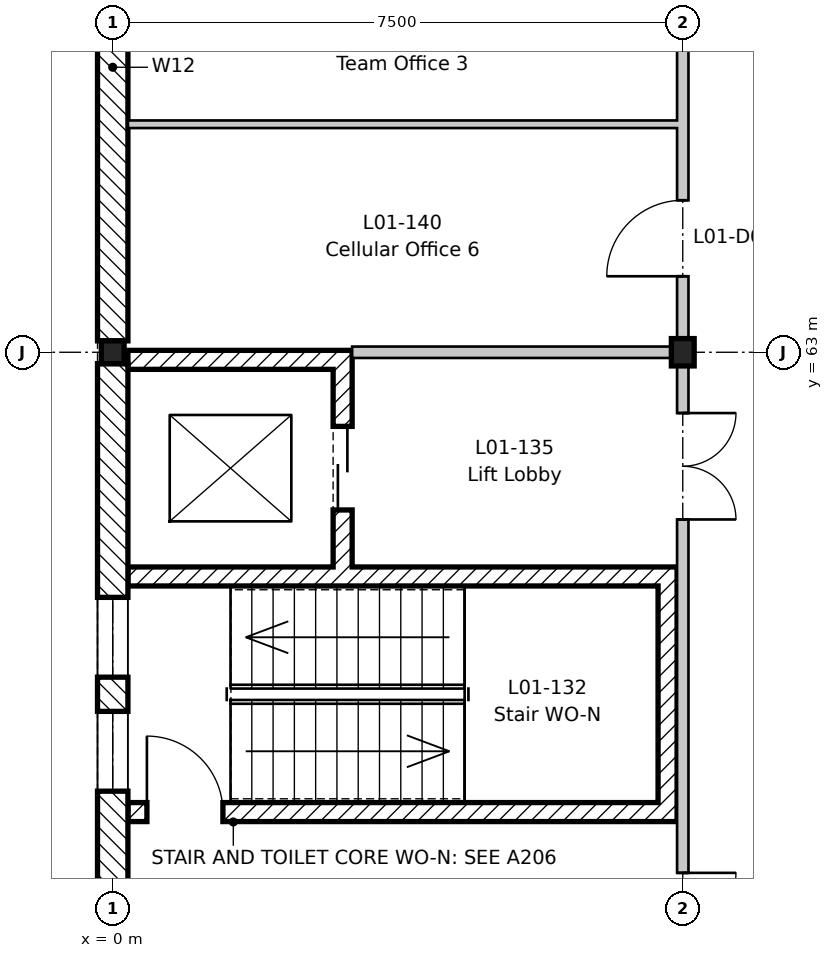
"""IFC4 building model, lengths in metres.
Left out: names, types, materials, properties, quantities, classifications, styles, units other than length and angle.
Written with IfcOpenShell. Run it as: python <this file> out.ifc"""

import sys

from ifc_helpers import new_model, si_unit, direction, frame, frame_2d, origin, origin_2d, place, context, subcontext, project, spatial, rectangle, i_section, extrude, element, fill, save


model = new_model("IFC4")
c1 = context("Model", 3, precision=1e-05, world=origin(), true_north=direction((0.0, 1.0)))
c2 = subcontext(c1, "Body", "Model", "MODEL_VIEW")
j1 = project(units=[si_unit("LENGTHUNIT", "METRE"), si_unit("PLANEANGLEUNIT", "RADIAN")], contexts=[c1])
p1 = place(None, origin())
s1 = spatial("IfcSite", under=j1, at=p1, CompositionType="ELEMENT")
p2 = place(p1, origin())
s2 = spatial("IfcBuilding", under=s1, at=p2, CompositionType="ELEMENT")
p3 = place(p2, frame((0.0, 0.0, 5.4)))
s3 = spatial("IfcBuildingStorey", under=s2, at=p3, CompositionType="ELEMENT", Elevation=5.4)
p4 = place(p3, frame((0.0, 63.0, -0.2), z_axis=(0.0, 0.0, 1.0), x_axis=(1.0, 0.0, 0.0)))
e1 = element("IfcColumn", 1, at=p4, inside=s3, PredefinedType="COLUMN", context=c2, shape_type="SweptSolid", body=[
    extrude(i_section(OverallWidth=0.3, OverallDepth=0.3, WebThickness=0.011, FlangeThickness=0.019, FilletRadius=0.027, at=origin_2d()), origin(), (0.0, 0.0, 1.0), 4.5),
])
p5 = place(p3, frame((7.5, 63.0, -0.2), z_axis=(0.0, 0.0, 1.0), x_axis=(1.0, 0.0, 0.0)))
e2 = element("IfcColumn", 2, at=p5, inside=s3, PredefinedType="COLUMN", context=c2, shape_type="SweptSolid", body=[
    extrude(i_section(OverallWidth=0.3, OverallDepth=0.36, WebThickness=0.012, FlangeThickness=0.022, FilletRadius=0.027, at=origin_2d()), origin(), (0.0, 0.0, 1.0), 4.5),
])
p6 = place(p3, frame((0.2, 56.95, 0.0), z_axis=(0.0, 0.0, 1.0), x_axis=(1.0, 0.0, 0.0)))
e3 = element("IfcWall", 3, at=p6, inside=s3, PredefinedType="SHEAR", context=c2, shape_type="SweptSolid", body=[
    extrude(rectangle(XDim=7.225, YDim=0.25, at=frame_2d((3.613, 0.0))), origin(), (0.0, 0.0, 1.0), 4.3),
])
p7 = place(p6, frame((0.25, 0.0, 0.0)))
e4 = element("IfcOpeningElement", 4, at=p7, cuts=e3, PredefinedType="OPENING", context=c2, shape_type="SweptSolid", body=[
    extrude(rectangle(XDim=1.0, YDim=2.1, at=frame_2d((0.5, 1.05))), frame((0.0, 0.135, 0.0), z_axis=(0.0, -1.0, 0.0), x_axis=(1.0, 0.0, 0.0)), (0.0, 0.0, 1.0), 0.27),
])
p8 = place(p3, frame((0.2, 60.05, 0.0), z_axis=(0.0, 0.0, 1.0), x_axis=(1.0, 0.0, 0.0)))
e5 = element("IfcWall", 5, at=p8, inside=s3, PredefinedType="SHEAR", context=c2, shape_type="SweptSolid", body=[
    extrude(rectangle(XDim=7.225, YDim=0.25, at=frame_2d((3.613, 0.0))), origin(), (0.0, 0.0, 1.0), 4.3),
])
p9 = place(p3, frame((7.3, 57.075, 0.0), z_axis=(0.0, 0.0, 1.0), x_axis=(0.0, 1.0, 0.0)))
e6 = element("IfcWall", 6, at=p9, inside=s3, PredefinedType="SHEAR", context=c2, shape_type="SweptSolid", body=[
    extrude(rectangle(XDim=2.85, YDim=0.25, at=frame_2d((1.425, 0.0))), origin(), (0.0, 0.0, 1.0), 4.3),
])
p10 = place(p3, frame((3.025, 60.175, 0.0), z_axis=(0.0, 0.0, 1.0), x_axis=(0.0, 1.0, 0.0)))
e7 = element("IfcWall", 7, at=p10, inside=s3, PredefinedType="SHEAR", context=c2, shape_type="SweptSolid", body=[
    extrude(rectangle(XDim=2.6, YDim=0.25, at=frame_2d((1.3, 0.0))), origin(), (0.0, 0.0, 1.0), 4.3),
])
p11 = place(p10, frame((0.75, 0.0, 0.0)))
e8 = element("IfcOpeningElement", 8, at=p11, cuts=e7, PredefinedType="OPENING", context=c2, shape_type="SweptSolid", body=[
    extrude(rectangle(XDim=1.1, YDim=2.1, at=frame_2d((0.55, 1.05))), frame((0.0, 0.135, 0.0), z_axis=(0.0, -1.0, 0.0), x_axis=(1.0, 0.0, 0.0)), (0.0, 0.0, 1.0), 0.27),
])
p12 = place(p3, frame((0.2, 62.9, 0.0), z_axis=(0.0, 0.0, 1.0), x_axis=(1.0, 0.0, 0.0)))
e9 = element("IfcWall", 9, at=p12, inside=s3, PredefinedType="SHEAR", context=c2, shape_type="SweptSolid", body=[
    extrude(rectangle(XDim=2.95, YDim=0.25, at=frame_2d((1.475, 0.0))), origin(), (0.0, 0.0, 1.0), 4.3),
])
p13 = place(p3, frame((0.0, 54.15, 0.0), z_axis=(0.0, 0.0, 1.0), x_axis=(0.0, 1.0, 0.0)))
e10 = element("IfcWall", 10, at=p13, inside=s3, PredefinedType="STANDARD", context=c2, shape_type="SweptSolid", body=[
    extrude(rectangle(XDim=8.7, YDim=0.4, at=frame_2d((4.35, 0.0))), origin(), (0.0, 0.0, 1.0), 3.9),
])
p14 = place(p13, frame((3.075, 0.0, 0.9)))
e11 = element("IfcOpeningElement", 11, at=p14, cuts=e10, PredefinedType="OPENING", context=c2, shape_type="SweptSolid", body=[
    extrude(rectangle(XDim=1.05, YDim=2.7, at=frame_2d((0.525, 1.35))), frame((0.0, 0.21, 0.0), z_axis=(0.0, -1.0, 0.0), x_axis=(1.0, 0.0, 0.0)), (0.0, 0.0, 1.0), 0.42),
])
p15 = place(p13, frame((4.575, 0.0, 0.9)))
e12 = element("IfcOpeningElement", 12, at=p15, cuts=e10, PredefinedType="OPENING", context=c2, shape_type="SweptSolid", body=[
    extrude(rectangle(XDim=1.05, YDim=2.7, at=frame_2d((0.525, 1.35))), frame((0.0, 0.21, 0.0), z_axis=(0.0, -1.0, 0.0), x_axis=(1.0, 0.0, 0.0)), (0.0, 0.0, 1.0), 0.42),
])
p16 = place(p3, frame((0.0, 63.15, 0.0), z_axis=(0.0, 0.0, 1.0), x_axis=(0.0, 1.0, 0.0)))
e13 = element("IfcWall", 13, at=p16, inside=s3, PredefinedType="STANDARD", context=c2, shape_type="SweptSolid", body=[
    extrude(rectangle(XDim=7.2, YDim=0.4, at=frame_2d((3.6, 0.0))), origin(), (0.0, 0.0, 1.0), 3.9),
])
p17 = place(p3, frame((7.5, -8.8, 0.0), z_axis=(0.0, 0.0, 1.0), x_axis=(0.0, 1.0, 0.0)))
e14 = element("IfcWall", 14, at=p17, inside=s3, PredefinedType="PARTITIONING", context=c2, shape_type="SweptSolid", body=[
    extrude(rectangle(XDim=79.3, YDim=0.15, at=frame_2d((39.65, 0.0))), origin(), (0.0, 0.0, 1.0), 3.78),
])
p18 = place(p17, frame((18.8, 0.0, 0.0)))
e15 = element("IfcOpeningElement", 15, at=p18, cuts=e14, PredefinedType="OPENING", context=c2, shape_type="SweptSolid", body=[
    extrude(rectangle(XDim=1.0, YDim=2.1, at=frame_2d((0.5, 1.05))), frame((0.0, 0.085, 0.0), z_axis=(0.0, -1.0, 0.0), x_axis=(1.0, 0.0, 0.0)), (0.0, 0.0, 1.0), 0.17),
])
p19 = place(p17, frame((23.3, 0.0, 0.0)))
e16 = element("IfcOpeningElement", 16, at=p19, cuts=e14, PredefinedType="OPENING", context=c2, shape_type="SweptSolid", body=[
    extrude(rectangle(XDim=1.0, YDim=2.1, at=frame_2d((0.5, 1.05))), frame((0.0, 0.085, 0.0), z_axis=(0.0, -1.0, 0.0), x_axis=(1.0, 0.0, 0.0)), (0.0, 0.0, 1.0), 0.17),
])
p20 = place(p17, frame((30.6, 0.0, 0.0)))
e17 = element("IfcOpeningElement", 17, at=p20, cuts=e14, PredefinedType="OPENING", context=c2, shape_type="SweptSolid", body=[
    extrude(rectangle(XDim=1.4, YDim=2.1, at=frame_2d((0.7, 1.05))), frame((0.0, 0.085, 0.0), z_axis=(0.0, -1.0, 0.0), x_axis=(1.0, 0.0, 0.0)), (0.0, 0.0, 1.0), 0.17),
])
p21 = place(p17, frame((45.8, 0.0, 0.0)))
e18 = element("IfcOpeningElement", 18, at=p21, cuts=e14, PredefinedType="OPENING", context=c2, shape_type="SweptSolid", body=[
    extrude(rectangle(XDim=1.0, YDim=2.1, at=frame_2d((0.5, 1.05))), frame((0.0, 0.085, 0.0), z_axis=(0.0, -1.0, 0.0), x_axis=(1.0, 0.0, 0.0)), (0.0, 0.0, 1.0), 0.17),
])
p22 = place(p17, frame((48.8, 0.0, 0.0)))
e19 = element("IfcOpeningElement", 19, at=p22, cuts=e14, PredefinedType="OPENING", context=c2, shape_type="SweptSolid", body=[
    extrude(rectangle(XDim=1.0, YDim=2.1, at=frame_2d((0.5, 1.05))), frame((0.0, 0.085, 0.0), z_axis=(0.0, -1.0, 0.0), x_axis=(1.0, 0.0, 0.0)), (0.0, 0.0, 1.0), 0.17),
])
p23 = place(p17, frame((51.8, 0.0, 0.0)))
e20 = element("IfcOpeningElement", 20, at=p23, cuts=e14, PredefinedType="OPENING", context=c2, shape_type="SweptSolid", body=[
    extrude(rectangle(XDim=1.0, YDim=2.1, at=frame_2d((0.5, 1.05))), frame((0.0, 0.085, 0.0), z_axis=(0.0, -1.0, 0.0), x_axis=(1.0, 0.0, 0.0)), (0.0, 0.0, 1.0), 0.17),
])
p24 = place(p17, frame((54.8, 0.0, 0.0)))
e21 = element("IfcOpeningElement", 21, at=p24, cuts=e14, PredefinedType="OPENING", context=c2, shape_type="SweptSolid", body=[
    extrude(rectangle(XDim=1.0, YDim=2.1, at=frame_2d((0.5, 1.05))), frame((0.0, 0.085, 0.0), z_axis=(0.0, -1.0, 0.0), x_axis=(1.0, 0.0, 0.0)), (0.0, 0.0, 1.0), 0.17),
])
p25 = place(p17, frame((59.3, 0.0, 0.0)))
e22 = element("IfcOpeningElement", 22, at=p25, cuts=e14, PredefinedType="OPENING", context=c2, shape_type="SweptSolid", body=[
    extrude(rectangle(XDim=1.0, YDim=2.1, at=frame_2d((0.5, 1.05))), frame((0.0, 0.085, 0.0), z_axis=(0.0, -1.0, 0.0), x_axis=(1.0, 0.0, 0.0)), (0.0, 0.0, 1.0), 0.17),
])
p26 = place(p17, frame((12.6, 0.0, 0.0)))
e23 = element("IfcOpeningElement", 23, at=p26, cuts=e14, PredefinedType="OPENING", context=c2, shape_type="SweptSolid", body=[
    extrude(rectangle(XDim=1.4, YDim=2.1, at=frame_2d((0.7, 1.05))), frame((0.0, 0.085, 0.0), z_axis=(0.0, -1.0, 0.0), x_axis=(1.0, 0.0, 0.0)), (0.0, 0.0, 1.0), 0.17),
])
p27 = place(p17, frame((3.6, 0.0, 0.0)))
e24 = element("IfcOpeningElement", 24, at=p27, cuts=e14, PredefinedType="OPENING", context=c2, shape_type="SweptSolid", body=[
    extrude(rectangle(XDim=1.4, YDim=2.1, at=frame_2d((0.7, 1.05))), frame((0.0, 0.085, 0.0), z_axis=(0.0, -1.0, 0.0), x_axis=(1.0, 0.0, 0.0)), (0.0, 0.0, 1.0), 0.17),
])
p28 = place(p17, frame((63.55, 0.0, 0.0)))
e25 = element("IfcOpeningElement", 25, at=p28, cuts=e14, PredefinedType="OPENING", context=c2, shape_type="SweptSolid", body=[
    extrude(rectangle(XDim=1.4, YDim=2.1, at=frame_2d((0.7, 1.05))), frame((0.0, 0.085, 0.0), z_axis=(0.0, -1.0, 0.0), x_axis=(1.0, 0.0, 0.0)), (0.0, 0.0, 1.0), 0.17),
])
p29 = place(p17, frame((69.6, 0.0, 0.0)))
e26 = element("IfcOpeningElement", 26, at=p29, cuts=e14, PredefinedType="OPENING", context=c2, shape_type="SweptSolid", body=[
    extrude(rectangle(XDim=1.4, YDim=2.1, at=frame_2d((0.7, 1.05))), frame((0.0, 0.085, 0.0), z_axis=(0.0, -1.0, 0.0), x_axis=(1.0, 0.0, 0.0)), (0.0, 0.0, 1.0), 0.17),
])
p30 = place(p17, frame((42.85, 0.0, 0.0)))
e27 = element("IfcOpeningElement", 27, at=p30, cuts=e14, PredefinedType="OPENING", context=c2, shape_type="SweptSolid", body=[
    extrude(rectangle(XDim=1.0, YDim=2.1, at=frame_2d((0.5, 1.05))), frame((0.0, 0.085, 0.0), z_axis=(0.0, -1.0, 0.0), x_axis=(1.0, 0.0, 0.0)), (0.0, 0.0, 1.0), 0.17),
])
p31 = place(p17, frame((36.55, 0.0, 0.0)))
e28 = element("IfcOpeningElement", 28, at=p31, cuts=e14, PredefinedType="OPENING", context=c2, shape_type="SweptSolid", body=[
    extrude(rectangle(XDim=1.4, YDim=2.1, at=frame_2d((0.7, 1.05))), frame((0.0, 0.085, 0.0), z_axis=(0.0, -1.0, 0.0), x_axis=(1.0, 0.0, 0.0)), (0.0, 0.0, 1.0), 0.17),
])
p32 = place(p17, frame((72.8, 0.0, 0.0)))
e29 = element("IfcOpeningElement", 29, at=p32, cuts=e14, PredefinedType="OPENING", context=c2, shape_type="SweptSolid", body=[
    extrude(rectangle(XDim=1.0, YDim=2.1, at=frame_2d((0.5, 1.05))), frame((0.0, 0.085, 0.0), z_axis=(0.0, -1.0, 0.0), x_axis=(1.0, 0.0, 0.0)), (0.0, 0.0, 1.0), 0.17),
])
p33 = place(p3, frame((3.15, 63.0, 0.0), z_axis=(0.0, 0.0, 1.0), x_axis=(1.0, 0.0, 0.0)))
e30 = element("IfcWall", 30, at=p33, inside=s3, PredefinedType="PARTITIONING", context=c2, shape_type="SweptSolid", body=[
    extrude(rectangle(XDim=4.275, YDim=0.15, at=frame_2d((2.138, 0.0))), origin(), (0.0, 0.0, 1.0), 3.95),
])
p34 = place(p3, frame((0.2, 66.0, 0.0), z_axis=(0.0, 0.0, 1.0), x_axis=(1.0, 0.0, 0.0)))
e31 = element("IfcWall", 31, at=p34, inside=s3, PredefinedType="PARTITIONING", context=c2, shape_type="SweptSolid", body=[
    extrude(rectangle(XDim=7.225, YDim=0.1, at=frame_2d((3.613, 0.0))), origin(), (0.0, 0.0, 1.0), 4.3),
])
p35 = place(p14, origin())
e32 = element("IfcWindow", 32, at=p35, inside=s3, PartitioningType="SINGLE_PANEL", PredefinedType="WINDOW", context=c2, shape_type="SweptSolid", body=[
    extrude(rectangle(XDim=1.05, YDim=2.7, at=frame_2d((0.525, 1.35))), frame((0.0, 0.03, 0.0), z_axis=(0.0, -1.0, 0.0), x_axis=(1.0, 0.0, 0.0)), (0.0, 0.0, 1.0), 0.06),
])
fill(e11, e32)
p36 = place(p15, origin())
e33 = element("IfcWindow", 33, at=p36, inside=s3, PartitioningType="SINGLE_PANEL", PredefinedType="WINDOW", context=c2, shape_type="SweptSolid", body=[
    extrude(rectangle(XDim=1.05, YDim=2.7, at=frame_2d((0.525, 1.35))), frame((0.0, 0.03, 0.0), z_axis=(0.0, -1.0, 0.0), x_axis=(1.0, 0.0, 0.0)), (0.0, 0.0, 1.0), 0.06),
])
fill(e12, e33)
p37 = place(p7, origin())
e34 = element("IfcDoor", 34, at=p37, inside=s3, OperationType="SINGLE_SWING_LEFT", PredefinedType="DOOR", context=c2, shape_type="SweptSolid", body=[
    extrude(rectangle(XDim=1.0, YDim=2.1, at=frame_2d((0.5, 1.05))), frame((0.0, 0.025, 0.0), z_axis=(0.0, -1.0, 0.0), x_axis=(1.0, 0.0, 0.0)), (0.0, 0.0, 1.0), 0.05),
])
fill(e4, e34)
p38 = place(p28, frame((1.4, 0.0, 0.0), z_axis=(0.0, 0.0, 1.0), x_axis=(-1.0, 0.0, 0.0)))
e35 = element("IfcDoor", 35, at=p38, inside=s3, OperationType="DOUBLE_DOOR_SINGLE_SWING", PredefinedType="DOOR", context=c2, shape_type="SweptSolid", body=[
    extrude(rectangle(XDim=1.4, YDim=2.1, at=frame_2d((0.7, 1.05))), frame((0.0, 0.025, 0.0), z_axis=(0.0, -1.0, 0.0), x_axis=(1.0, 0.0, 0.0)), (0.0, 0.0, 1.0), 0.05),
])
fill(e25, e35)
p39 = place(p29, frame((1.4, 0.0, 0.0), z_axis=(0.0, 0.0, 1.0), x_axis=(-1.0, 0.0, 0.0)))
e36 = element("IfcDoor", 36, at=p39, inside=s3, OperationType="DOUBLE_DOOR_SINGLE_SWING", PredefinedType="DOOR", context=c2, shape_type="SweptSolid", body=[
    extrude(rectangle(XDim=1.4, YDim=2.1, at=frame_2d((0.7, 1.05))), frame((0.0, 0.025, 0.0), z_axis=(0.0, -1.0, 0.0), x_axis=(1.0, 0.0, 0.0)), (0.0, 0.0, 1.0), 0.05),
])
fill(e26, e36)
p40 = place(p32, origin())
e37 = element("IfcDoor", 37, at=p40, inside=s3, OperationType="SINGLE_SWING_LEFT", PredefinedType="DOOR", context=c2, shape_type="SweptSolid", body=[
    extrude(rectangle(XDim=1.0, YDim=2.1, at=frame_2d((0.5, 1.05))), frame((0.0, 0.025, 0.0), z_axis=(0.0, -1.0, 0.0), x_axis=(1.0, 0.0, 0.0)), (0.0, 0.0, 1.0), 0.05),
])
fill(e29, e37)
p41 = place(p11, origin())
e38 = element("IfcDoor", 38, at=p41, inside=s3, OperationType="SLIDING_TO_LEFT", PredefinedType="DOOR", context=c2, shape_type="SweptSolid", body=[
    extrude(rectangle(XDim=1.1, YDim=2.1, at=frame_2d((0.55, 1.05))), frame((0.0, 0.025, 0.0), z_axis=(0.0, -1.0, 0.0), x_axis=(1.0, 0.0, 0.0)), (0.0, 0.0, 1.0), 0.05),
])
fill(e8, e38)
save(model, sys.argv[1])
